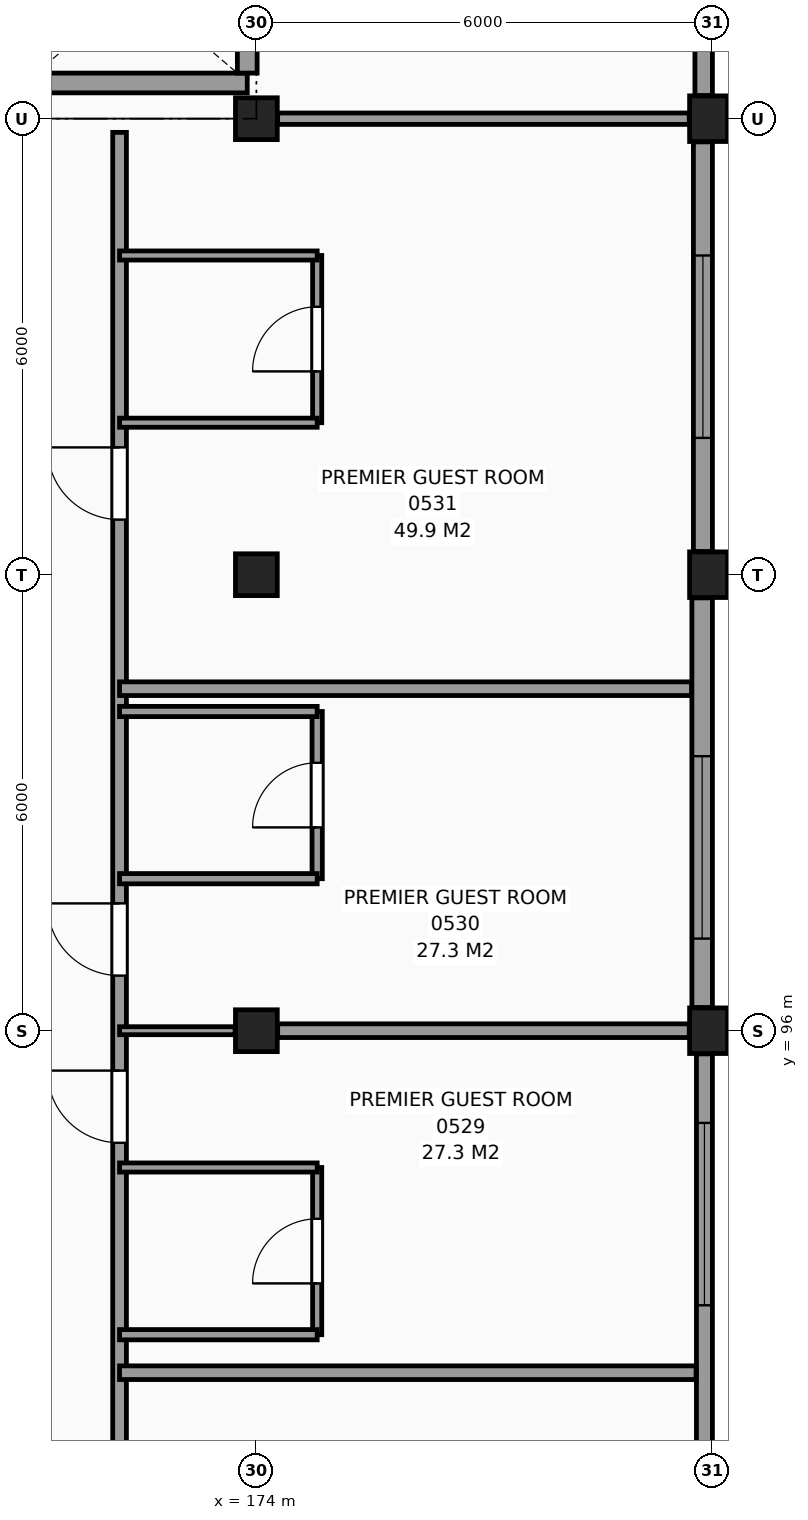
"""IFC4 building model, lengths in metres.
Left out: names, types, materials, properties, quantities, classifications, styles, units other than length and angle.
Written with IfcOpenShell. Run it as: python <this file> out.ifc"""

import sys

from ifc_helpers import new_model, si_unit, direction, frame, frame_2d, origin, origin_2d, place, context, subcontext, project, spatial, rectangle, extrude, element, fill, save


model = new_model("IFC4")
c1 = context("Model", 3, precision=1e-05, world=origin(), true_north=direction((0.0, 1.0)))
c2 = subcontext(c1, "Body", "Model", "MODEL_VIEW")
j1 = project(units=[si_unit("LENGTHUNIT", "METRE"), si_unit("PLANEANGLEUNIT", "RADIAN")], contexts=[c1])
p1 = place(None, origin())
s1 = spatial("IfcSite", under=j1, at=p1, CompositionType="ELEMENT")
p2 = place(p1, origin())
s2 = spatial("IfcBuilding", under=s1, at=p2, CompositionType="ELEMENT")
p3 = place(p2, frame((0.0, 0.0, 24.6)))
s3 = spatial("IfcBuildingStorey", under=s2, at=p3, CompositionType="ELEMENT", Elevation=24.6)
for number, where, z_axis, x_axis in (
    (1, (174.0, 96.0, 0.0), (0.0, 0.0, 1.0), (1.0, 0.0, 0.0)),
    (2, (174.0, 102.0, 0.0), (0.0, 0.0, 1.0), (1.0, 0.0, 0.0)),
    (3, (174.0, 108.0, 0.0), (0.0, 0.0, 1.0), (1.0, 0.0, 0.0)),
):
    element("IfcColumn", number, at=place(p3, frame(where, z_axis=z_axis, x_axis=x_axis)), inside=s3, PredefinedType="COLUMN", context=c2, shape_type="SweptSolid", body=[
        extrude(rectangle(XDim=0.55, YDim=0.55, at=origin_2d()), origin(), (0.0, 0.0, 1.0), 3.6),
    ])
for number, where, z_axis, x_axis in (
    (4, (180.0, 96.0, 0.0), (0.0, 0.0, 1.0), (1.0, 0.0, 0.0)),
    (5, (180.0, 102.0, 0.0), (0.0, 0.0, 1.0), (1.0, 0.0, 0.0)),
    (6, (180.0, 108.0, 0.0), (0.0, 0.0, 1.0), (1.0, 0.0, 0.0)),
):
    element("IfcColumn", number, at=place(p3, frame(where, z_axis=z_axis, x_axis=x_axis)), inside=s3, PredefinedType="COLUMN", context=c2, shape_type="SweptSolid", body=[
        extrude(rectangle(XDim=0.6, YDim=0.6, at=origin_2d()), origin(), (0.0, 0.0, 1.0), 3.6),
    ])
p4 = place(p3, frame((179.895, 90.305, 0.0), z_axis=(0.0, 0.0, 1.0), x_axis=(0.0, 1.0, 0.0)))
e7 = element("IfcWall", 7, at=p4, inside=s3, PredefinedType="SOLIDWALL", context=c2, shape_type="SweptSolid", body=[
    extrude(rectangle(XDim=5.39, YDim=0.21, at=frame_2d((2.695, 0.0))), origin(), (0.0, 0.0, 1.0), 2.73),
])
p5 = place(p4, frame((2.082, 0.0, 0.8)))
e8 = element("IfcOpeningElement", 8, at=p5, cuts=e7, PredefinedType="OPENING", context=c2, shape_type="SweptSolid", body=[
    extrude(rectangle(XDim=2.4, YDim=1.75, at=frame_2d((1.2, 0.875))), frame((0.0, 0.115, 0.0), z_axis=(0.0, -1.0, 0.0), x_axis=(1.0, 0.0, 0.0)), (0.0, 0.0, 1.0), 0.23),
])
p6 = place(p3, frame((179.865, 96.305, 0.0), z_axis=(0.0, 0.0, 1.0), x_axis=(0.0, 1.0, 0.0)))
e9 = element("IfcWall", 9, at=p6, inside=s3, PredefinedType="SOLIDWALL", context=c2, shape_type="SweptSolid", body=[
    extrude(rectangle(XDim=5.39, YDim=0.27, at=frame_2d((2.695, 0.0))), origin(), (0.0, 0.0, 1.0), 2.73),
])
p7 = place(p6, frame((0.907, 0.0, 0.8)))
e10 = element("IfcOpeningElement", 10, at=p7, cuts=e9, PredefinedType="OPENING", context=c2, shape_type="SweptSolid", body=[
    extrude(rectangle(XDim=2.4, YDim=1.75, at=frame_2d((1.2, 0.875))), frame((0.0, 0.145, 0.0), z_axis=(0.0, -1.0, 0.0), x_axis=(1.0, 0.0, 0.0)), (0.0, 0.0, 1.0), 0.29),
])
p8 = place(p3, frame((179.875, 102.305, 0.0), z_axis=(0.0, 0.0, 1.0), x_axis=(0.0, 1.0, 0.0)))
e11 = element("IfcWall", 11, at=p8, inside=s3, PredefinedType="SOLIDWALL", context=c2, shape_type="SweptSolid", body=[
    extrude(rectangle(XDim=5.39, YDim=0.25, at=frame_2d((2.695, 0.0))), origin(), (0.0, 0.0, 1.0), 2.73),
])
p9 = place(p8, frame((1.495, 0.0, 0.8)))
e12 = element("IfcOpeningElement", 12, at=p9, cuts=e11, PredefinedType="OPENING", context=c2, shape_type="SweptSolid", body=[
    extrude(rectangle(XDim=2.4, YDim=1.75, at=frame_2d((1.2, 0.875))), frame((0.0, 0.135, 0.0), z_axis=(0.0, -1.0, 0.0), x_axis=(1.0, 0.0, 0.0)), (0.0, 0.0, 1.0), 0.27),
])
p10 = place(p3, frame((179.885, 108.305, 0.0), z_axis=(0.0, 0.0, 1.0), x_axis=(0.0, 1.0, 0.0)))
e13 = element("IfcWall", 13, at=p10, inside=s3, PredefinedType="SOLIDWALL", context=c2, shape_type="SweptSolid", body=[
    extrude(rectangle(XDim=5.39, YDim=0.23, at=frame_2d((2.695, 0.0))), origin(), (0.0, 0.0, 1.0), 2.73),
])
p11 = place(p3, frame((170.97, 108.47, 0.0), z_axis=(0.0, 0.0, 1.0), x_axis=(1.0, 0.0, 0.0)))
e14 = element("IfcWall", 14, at=p11, inside=s3, PredefinedType="SHEAR", context=c2, shape_type="SweptSolid", body=[
    extrude(rectangle(XDim=2.91, YDim=0.26, at=frame_2d((1.455, 0.0))), origin(), (0.0, 0.0, 1.0), 3.6),
])
p12 = place(p3, frame((173.88, 108.6, 0.0), z_axis=(0.0, 0.0, 1.0), x_axis=(0.0, 1.0, 0.0)))
e15 = element("IfcWall", 15, at=p12, inside=s3, PredefinedType="SHEAR", context=c2, shape_type="SweptSolid", body=[
    extrude(rectangle(XDim=2.25, YDim=0.26, at=frame_2d((1.125, 0.0))), origin(), (0.0, 0.0, 1.0), 3.6),
])
p13 = place(p3, frame((172.2, 42.215, 0.0), z_axis=(0.0, 0.0, 1.0), x_axis=(0.0, 1.0, 0.0)))
e16 = element("IfcWall", 16, at=p13, inside=s3, PredefinedType="PARTITIONING", context=c2, shape_type="SweptSolid", body=[
    extrude(rectangle(XDim=65.605, YDim=0.18, at=frame_2d((32.802, 0.0))), origin(), (0.0, 0.0, 1.0), 3.38),
])
p14 = place(p13, frame((7.61, 0.0, 0.0)))
e17 = element("IfcOpeningElement", 17, at=p14, cuts=e16, PredefinedType="OPENING", context=c2, shape_type="SweptSolid", body=[
    extrude(rectangle(XDim=0.95, YDim=2.1, at=frame_2d((0.475, 1.05))), frame((0.0, 0.1, 0.0), z_axis=(0.0, -1.0, 0.0), x_axis=(1.0, 0.0, 0.0)), (0.0, 0.0, 1.0), 0.2),
])
p15 = place(p13, frame((12.11, 0.0, 0.0)))
e18 = element("IfcOpeningElement", 18, at=p15, cuts=e16, PredefinedType="OPENING", context=c2, shape_type="SweptSolid", body=[
    extrude(rectangle(XDim=0.95, YDim=2.1, at=frame_2d((0.475, 1.05))), frame((0.0, 0.1, 0.0), z_axis=(0.0, -1.0, 0.0), x_axis=(1.0, 0.0, 0.0)), (0.0, 0.0, 1.0), 0.2),
])
p16 = place(p13, frame((16.31, 0.0, 0.0)))
e19 = element("IfcOpeningElement", 19, at=p16, cuts=e16, PredefinedType="OPENING", context=c2, shape_type="SweptSolid", body=[
    extrude(rectangle(XDim=0.95, YDim=2.1, at=frame_2d((0.475, 1.05))), frame((0.0, 0.1, 0.0), z_axis=(0.0, -1.0, 0.0), x_axis=(1.0, 0.0, 0.0)), (0.0, 0.0, 1.0), 0.2),
])
p17 = place(p13, frame((25.61, 0.0, 0.0)))
e20 = element("IfcOpeningElement", 20, at=p17, cuts=e16, PredefinedType="OPENING", context=c2, shape_type="SweptSolid", body=[
    extrude(rectangle(XDim=0.95, YDim=2.1, at=frame_2d((0.475, 1.05))), frame((0.0, 0.1, 0.0), z_axis=(0.0, -1.0, 0.0), x_axis=(1.0, 0.0, 0.0)), (0.0, 0.0, 1.0), 0.2),
])
p18 = place(p13, frame((30.11, 0.0, 0.0)))
e21 = element("IfcOpeningElement", 21, at=p18, cuts=e16, PredefinedType="OPENING", context=c2, shape_type="SweptSolid", body=[
    extrude(rectangle(XDim=0.95, YDim=2.1, at=frame_2d((0.475, 1.05))), frame((0.0, 0.1, 0.0), z_axis=(0.0, -1.0, 0.0), x_axis=(1.0, 0.0, 0.0)), (0.0, 0.0, 1.0), 0.2),
])
p19 = place(p13, frame((34.31, 0.0, 0.0)))
e22 = element("IfcOpeningElement", 22, at=p19, cuts=e16, PredefinedType="OPENING", context=c2, shape_type="SweptSolid", body=[
    extrude(rectangle(XDim=0.95, YDim=2.1, at=frame_2d((0.475, 1.05))), frame((0.0, 0.1, 0.0), z_axis=(0.0, -1.0, 0.0), x_axis=(1.0, 0.0, 0.0)), (0.0, 0.0, 1.0), 0.2),
])
p20 = place(p13, frame((36.51, 0.0, 0.0)))
e23 = element("IfcOpeningElement", 23, at=p20, cuts=e16, PredefinedType="OPENING", context=c2, shape_type="SweptSolid", body=[
    extrude(rectangle(XDim=0.95, YDim=2.1, at=frame_2d((0.475, 1.05))), frame((0.0, 0.1, 0.0), z_axis=(0.0, -1.0, 0.0), x_axis=(1.0, 0.0, 0.0)), (0.0, 0.0, 1.0), 0.2),
])
p21 = place(p13, frame((42.51, 0.0, 0.0)))
e24 = element("IfcOpeningElement", 24, at=p21, cuts=e16, PredefinedType="OPENING", context=c2, shape_type="SweptSolid", body=[
    extrude(rectangle(XDim=0.95, YDim=2.1, at=frame_2d((0.475, 1.05))), frame((0.0, 0.1, 0.0), z_axis=(0.0, -1.0, 0.0), x_axis=(1.0, 0.0, 0.0)), (0.0, 0.0, 1.0), 0.2),
])
p22 = place(p13, frame((52.31, 0.0, 0.0)))
e25 = element("IfcOpeningElement", 25, at=p22, cuts=e16, PredefinedType="OPENING", context=c2, shape_type="SweptSolid", body=[
    extrude(rectangle(XDim=0.95, YDim=2.1, at=frame_2d((0.475, 1.05))), frame((0.0, 0.1, 0.0), z_axis=(0.0, -1.0, 0.0), x_axis=(1.0, 0.0, 0.0)), (0.0, 0.0, 1.0), 0.2),
])
p23 = place(p13, frame((54.51, 0.0, 0.0)))
e26 = element("IfcOpeningElement", 26, at=p23, cuts=e16, PredefinedType="OPENING", context=c2, shape_type="SweptSolid", body=[
    extrude(rectangle(XDim=0.95, YDim=2.1, at=frame_2d((0.475, 1.05))), frame((0.0, 0.1, 0.0), z_axis=(0.0, -1.0, 0.0), x_axis=(1.0, 0.0, 0.0)), (0.0, 0.0, 1.0), 0.2),
])
p24 = place(p13, frame((60.51, 0.0, 0.0)))
e27 = element("IfcOpeningElement", 27, at=p24, cuts=e16, PredefinedType="OPENING", context=c2, shape_type="SweptSolid", body=[
    extrude(rectangle(XDim=0.95, YDim=2.1, at=frame_2d((0.475, 1.05))), frame((0.0, 0.1, 0.0), z_axis=(0.0, -1.0, 0.0), x_axis=(1.0, 0.0, 0.0)), (0.0, 0.0, 1.0), 0.2),
])
p25 = place(p3, frame((174.8, 92.0, 0.0), z_axis=(0.0, 0.0, 1.0), x_axis=(0.0, 1.0, 0.0)))
e28 = element("IfcWall", 28, at=p25, inside=s3, PredefinedType="PARTITIONING", context=c2, shape_type="SweptSolid", body=[
    extrude(rectangle(XDim=2.2, YDim=0.12, at=frame_2d((1.1, 0.0))), origin(), (0.0, 0.0, 1.0), 3.38),
])
p26 = place(p25, frame((0.675, 0.0, 0.0)))
e29 = element("IfcOpeningElement", 29, at=p26, cuts=e28, PredefinedType="OPENING", context=c2, shape_type="SweptSolid", body=[
    extrude(rectangle(XDim=0.85, YDim=2.1, at=frame_2d((0.425, 1.05))), frame((0.0, 0.07, 0.0), z_axis=(0.0, -1.0, 0.0), x_axis=(1.0, 0.0, 0.0)), (0.0, 0.0, 1.0), 0.14),
])
p27 = place(p3, frame((174.8, 98.0, 0.0), z_axis=(0.0, 0.0, 1.0), x_axis=(0.0, 1.0, 0.0)))
e30 = element("IfcWall", 30, at=p27, inside=s3, PredefinedType="PARTITIONING", context=c2, shape_type="SweptSolid", body=[
    extrude(rectangle(XDim=2.2, YDim=0.135, at=frame_2d((1.1, 0.0))), origin(), (0.0, 0.0, 1.0), 3.38),
])
p28 = place(p27, frame((0.675, 0.0, 0.0)))
e31 = element("IfcOpeningElement", 31, at=p28, cuts=e30, PredefinedType="OPENING", context=c2, shape_type="SweptSolid", body=[
    extrude(rectangle(XDim=0.85, YDim=2.1, at=frame_2d((0.425, 1.05))), frame((0.0, 0.078, 0.0), z_axis=(0.0, -1.0, 0.0), x_axis=(1.0, 0.0, 0.0)), (0.0, 0.0, 1.0), 0.155),
])
p29 = place(p3, frame((174.8, 104.0, 0.0), z_axis=(0.0, 0.0, 1.0), x_axis=(0.0, 1.0, 0.0)))
e32 = element("IfcWall", 32, at=p29, inside=s3, PredefinedType="PARTITIONING", context=c2, shape_type="SweptSolid", body=[
    extrude(rectangle(XDim=2.2, YDim=0.12, at=frame_2d((1.1, 0.0))), origin(), (0.0, 0.0, 1.0), 3.38),
])
p30 = place(p29, frame((0.675, 0.0, 0.0)))
e33 = element("IfcOpeningElement", 33, at=p30, cuts=e32, PredefinedType="OPENING", context=c2, shape_type="SweptSolid", body=[
    extrude(rectangle(XDim=0.85, YDim=2.1, at=frame_2d((0.425, 1.05))), frame((0.0, 0.07, 0.0), z_axis=(0.0, -1.0, 0.0), x_axis=(1.0, 0.0, 0.0)), (0.0, 0.0, 1.0), 0.14),
])
p31 = place(p3, frame((172.2, 91.5, 0.0), z_axis=(0.0, 0.0, 1.0), x_axis=(1.0, 0.0, 0.0)))
e34 = element("IfcWall", 34, at=p31, inside=s3, PredefinedType="PARTITIONING", context=c2, shape_type="SweptSolid", body=[
    extrude(rectangle(XDim=7.585, YDim=0.18, at=frame_2d((3.792, 0.0))), origin(), (0.0, 0.0, 1.0), 3.38),
])
p32 = place(p3, frame((172.2, 92.0, 0.0), z_axis=(0.0, 0.0, 1.0), x_axis=(1.0, 0.0, 0.0)))
e35 = element("IfcWall", 35, at=p32, inside=s3, PredefinedType="PARTITIONING", context=c2, shape_type="SweptSolid", body=[
    extrude(rectangle(XDim=2.6, YDim=0.135, at=frame_2d((1.3, 0.0))), origin(), (0.0, 0.0, 1.0), 3.38),
])
p33 = place(p3, frame((172.2, 94.2, 0.0), z_axis=(0.0, 0.0, 1.0), x_axis=(1.0, 0.0, 0.0)))
e36 = element("IfcWall", 36, at=p33, inside=s3, PredefinedType="PARTITIONING", context=c2, shape_type="SweptSolid", body=[
    extrude(rectangle(XDim=2.6, YDim=0.12, at=frame_2d((1.3, 0.0))), origin(), (0.0, 0.0, 1.0), 3.38),
])
p34 = place(p3, frame((172.2, 96.0, 0.0), z_axis=(0.0, 0.0, 1.0), x_axis=(1.0, 0.0, 0.0)))
e37 = element("IfcWall", 37, at=p34, inside=s3, PredefinedType="PARTITIONING", context=c2, shape_type="SweptSolid", body=[
    extrude(rectangle(XDim=1.52, YDim=0.105, at=frame_2d((0.76, 0.0))), origin(), (0.0, 0.0, 1.0), 3.09),
])
p35 = place(p3, frame((174.28, 96.0, 0.0), z_axis=(0.0, 0.0, 1.0), x_axis=(1.0, 0.0, 0.0)))
e38 = element("IfcWall", 38, at=p35, inside=s3, PredefinedType="PARTITIONING", context=c2, shape_type="SweptSolid", body=[
    extrude(rectangle(XDim=5.415, YDim=0.18, at=frame_2d((2.708, 0.0))), origin(), (0.0, 0.0, 1.0), 2.58),
])
for number, where, z_axis, x_axis in (
    (39, (172.2, 98.0, 0.0), (0.0, 0.0, 1.0), (1.0, 0.0, 0.0)),
    (40, (172.2, 100.2, 0.0), (0.0, 0.0, 1.0), (1.0, 0.0, 0.0)),
):
    element("IfcWall", number, at=place(p3, frame(where, z_axis=z_axis, x_axis=x_axis)), inside=s3, PredefinedType="PARTITIONING", context=c2, shape_type="SweptSolid", body=[
        extrude(rectangle(XDim=2.6, YDim=0.135, at=frame_2d((1.3, 0.0))), origin(), (0.0, 0.0, 1.0), 3.38),
    ])
p36 = place(p3, frame((172.2, 100.5, 0.0), z_axis=(0.0, 0.0, 1.0), x_axis=(1.0, 0.0, 0.0)))
e41 = element("IfcWall", 41, at=p36, inside=s3, PredefinedType="PARTITIONING", context=c2, shape_type="SweptSolid", body=[
    extrude(rectangle(XDim=7.525, YDim=0.18, at=frame_2d((3.763, 0.0))), origin(), (0.0, 0.0, 1.0), 3.38),
])
for number, where, z_axis, x_axis in (
    (42, (172.2, 104.0, 0.0), (0.0, 0.0, 1.0), (1.0, 0.0, 0.0)),
    (43, (172.2, 106.2, 0.0), (0.0, 0.0, 1.0), (1.0, 0.0, 0.0)),
):
    element("IfcWall", number, at=place(p3, frame(where, z_axis=z_axis, x_axis=x_axis)), inside=s3, PredefinedType="PARTITIONING", context=c2, shape_type="SweptSolid", body=[
        extrude(rectangle(XDim=2.6, YDim=0.12, at=frame_2d((1.3, 0.0))), origin(), (0.0, 0.0, 1.0), 3.38),
    ])
p37 = place(p3, frame((174.28, 108.0, 0.0), z_axis=(0.0, 0.0, 1.0), x_axis=(1.0, 0.0, 0.0)))
e44 = element("IfcWall", 44, at=p37, inside=s3, PredefinedType="PARTITIONING", context=c2, shape_type="SweptSolid", body=[
    extrude(rectangle(XDim=5.415, YDim=0.15, at=frame_2d((2.708, 0.0))), origin(), (0.0, 0.0, 1.0), 2.58),
])
p38 = place(p5, origin())
e45 = element("IfcWindow", 45, at=p38, inside=s3, PartitioningType="SINGLE_PANEL", PredefinedType="WINDOW", context=c2, shape_type="SweptSolid", body=[
    extrude(rectangle(XDim=2.4, YDim=1.75, at=frame_2d((1.2, 0.875))), frame((0.0, 0.03, 0.0), z_axis=(0.0, -1.0, 0.0), x_axis=(1.0, 0.0, 0.0)), (0.0, 0.0, 1.0), 0.06),
])
fill(e8, e45)
p39 = place(p7, origin())
e46 = element("IfcWindow", 46, at=p39, inside=s3, PartitioningType="SINGLE_PANEL", PredefinedType="WINDOW", context=c2, shape_type="SweptSolid", body=[
    extrude(rectangle(XDim=2.4, YDim=1.75, at=frame_2d((1.2, 0.875))), frame((0.0, 0.03, 0.0), z_axis=(0.0, -1.0, 0.0), x_axis=(1.0, 0.0, 0.0)), (0.0, 0.0, 1.0), 0.06),
])
fill(e10, e46)
p40 = place(p9, origin())
e47 = element("IfcWindow", 47, at=p40, inside=s3, PartitioningType="SINGLE_PANEL", PredefinedType="WINDOW", context=c2, shape_type="SweptSolid", body=[
    extrude(rectangle(XDim=2.4, YDim=1.75, at=frame_2d((1.2, 0.875))), frame((0.0, 0.03, 0.0), z_axis=(0.0, -1.0, 0.0), x_axis=(1.0, 0.0, 0.0)), (0.0, 0.0, 1.0), 0.06),
])
fill(e12, e47)
p41 = place(p26, origin())
e48 = element("IfcDoor", 48, at=p41, inside=s3, OperationType="SINGLE_SWING_LEFT", PredefinedType="DOOR", context=c2, shape_type="SweptSolid", body=[
    extrude(rectangle(XDim=0.85, YDim=2.1, at=frame_2d((0.425, 1.05))), frame((0.0, 0.025, 0.0), z_axis=(0.0, -1.0, 0.0), x_axis=(1.0, 0.0, 0.0)), (0.0, 0.0, 1.0), 0.05),
])
fill(e29, e48)
p42 = place(p22, origin())
e49 = element("IfcDoor", 49, at=p42, inside=s3, OperationType="SINGLE_SWING_RIGHT", PredefinedType="DOOR", context=c2, shape_type="SweptSolid", body=[
    extrude(rectangle(XDim=0.95, YDim=2.1, at=frame_2d((0.475, 1.05))), frame((0.0, 0.025, 0.0), z_axis=(0.0, -1.0, 0.0), x_axis=(1.0, 0.0, 0.0)), (0.0, 0.0, 1.0), 0.05),
])
fill(e25, e49)
p43 = place(p28, origin())
e50 = element("IfcDoor", 50, at=p43, inside=s3, OperationType="SINGLE_SWING_LEFT", PredefinedType="DOOR", context=c2, shape_type="SweptSolid", body=[
    extrude(rectangle(XDim=0.85, YDim=2.1, at=frame_2d((0.425, 1.05))), frame((0.0, 0.025, 0.0), z_axis=(0.0, -1.0, 0.0), x_axis=(1.0, 0.0, 0.0)), (0.0, 0.0, 1.0), 0.05),
])
fill(e31, e50)
p44 = place(p23, origin())
e51 = element("IfcDoor", 51, at=p44, inside=s3, OperationType="SINGLE_SWING_RIGHT", PredefinedType="DOOR", context=c2, shape_type="SweptSolid", body=[
    extrude(rectangle(XDim=0.95, YDim=2.1, at=frame_2d((0.475, 1.05))), frame((0.0, 0.025, 0.0), z_axis=(0.0, -1.0, 0.0), x_axis=(1.0, 0.0, 0.0)), (0.0, 0.0, 1.0), 0.05),
])
fill(e26, e51)
p45 = place(p30, origin())
e52 = element("IfcDoor", 52, at=p45, inside=s3, OperationType="SINGLE_SWING_LEFT", PredefinedType="DOOR", context=c2, shape_type="SweptSolid", body=[
    extrude(rectangle(XDim=0.85, YDim=2.1, at=frame_2d((0.425, 1.05))), frame((0.0, 0.025, 0.0), z_axis=(0.0, -1.0, 0.0), x_axis=(1.0, 0.0, 0.0)), (0.0, 0.0, 1.0), 0.05),
])
fill(e33, e52)
p46 = place(p24, origin())
e53 = element("IfcDoor", 53, at=p46, inside=s3, OperationType="SINGLE_SWING_RIGHT", PredefinedType="DOOR", context=c2, shape_type="SweptSolid", body=[
    extrude(rectangle(XDim=0.95, YDim=2.1, at=frame_2d((0.475, 1.05))), frame((0.0, 0.025, 0.0), z_axis=(0.0, -1.0, 0.0), x_axis=(1.0, 0.0, 0.0)), (0.0, 0.0, 1.0), 0.05),
])
fill(e27, e53)
save(model, sys.argv[1])
